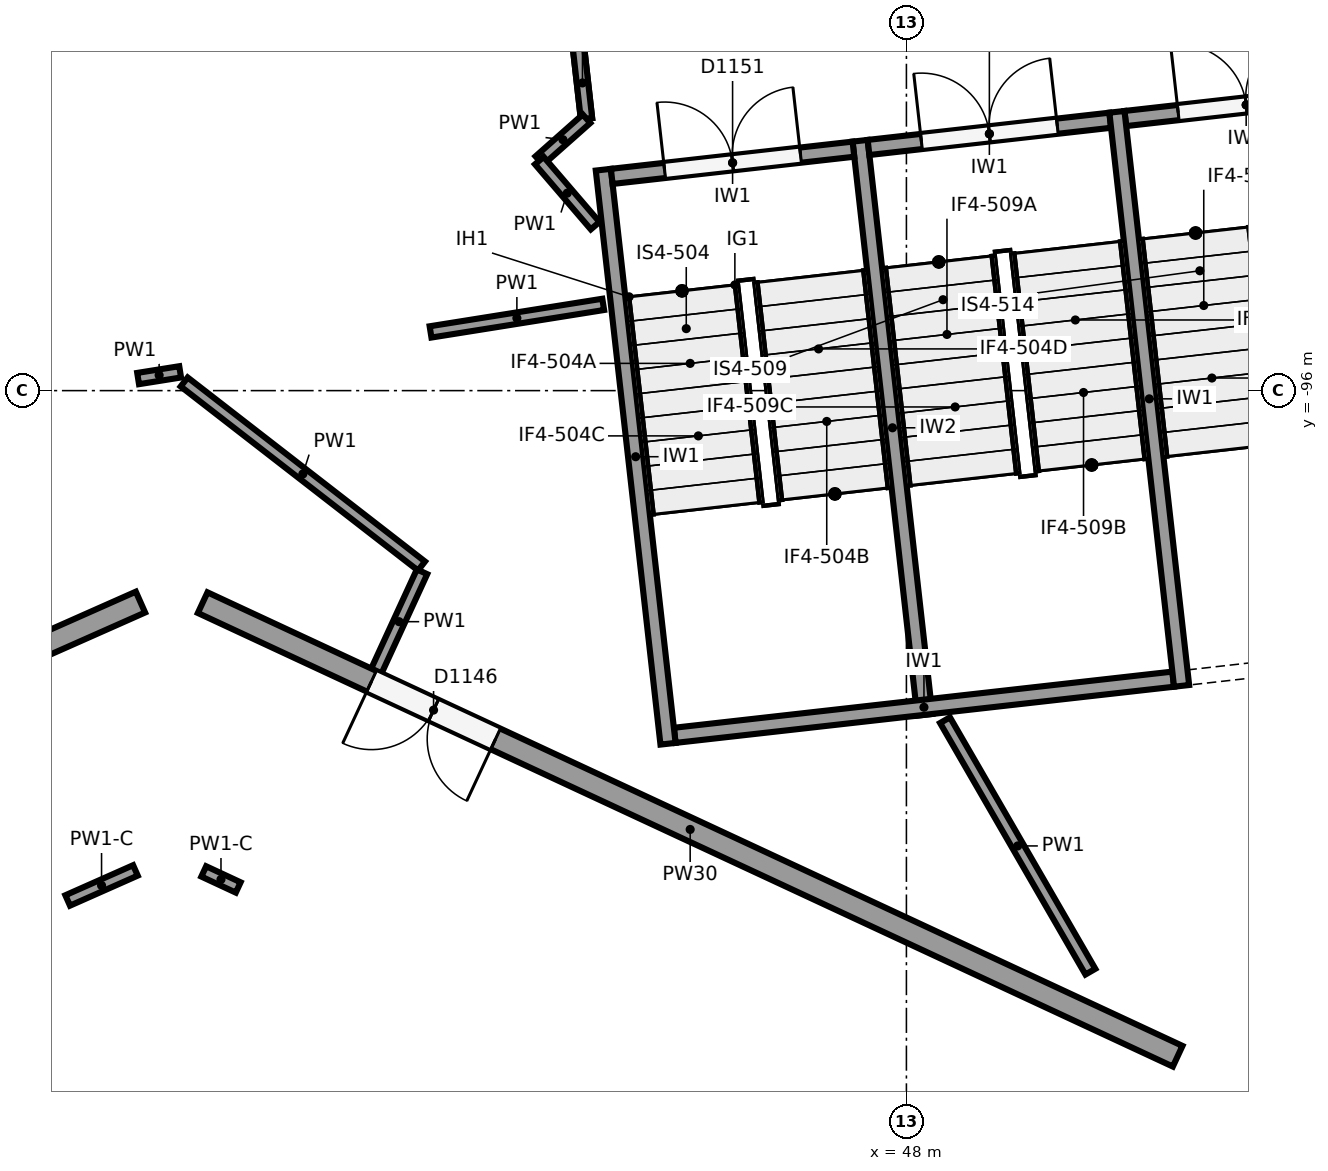
"""IFC4 building model, lengths in metres.
Left out: names, types, materials, properties, quantities, classifications, styles, units other than length and angle.
Written with IfcOpenShell. Run it as: python <this file> out.ifc"""

import sys

from ifc_helpers import new_model, si_unit, direction, frame, frame_2d, origin, origin_2d, place, context, subcontext, project, spatial, rectangle, circle, extrude, element, fill, save


model = new_model("IFC4")
c1 = context("Model", 3, precision=1e-05, world=origin(), true_north=direction((0.0, 1.0)))
c2 = subcontext(c1, "Body", "Model", "MODEL_VIEW")
j1 = project(units=[si_unit("LENGTHUNIT", "METRE"), si_unit("PLANEANGLEUNIT", "RADIAN")], contexts=[c1])
p1 = place(None, origin())
s1 = spatial("IfcSite", under=j1, at=p1, CompositionType="ELEMENT")
p2 = place(p1, origin())
s2 = spatial("IfcBuilding", under=s1, at=p2, CompositionType="ELEMENT")
p3 = place(p2, frame((0.0, 0.0, 12.0)))
s3 = spatial("IfcBuildingStorey", under=s2, at=p3, CompositionType="ELEMENT", Elevation=12.0)
p4 = place(p3, frame((38.333, -98.6, 0.0), z_axis=(0.0, 0.0, 1.0), x_axis=(1.0, 0.0, 0.0)))
e1 = element("IfcColumn", 1, at=p4, inside=s3, PredefinedType="COLUMN", context=c2, shape_type="SweptSolid", body=[
    extrude(circle(Radius=0.45, at=origin_2d()), origin(), (0.0, 0.0, 1.0), 6.0),
])
p5 = place(p3, frame((44.683, -91.091, 0.0), z_axis=(0.0, 0.0, 1.0), x_axis=(1.0, 0.0, 0.0)))
e2 = element("IfcColumn", 2, at=p5, inside=s3, PredefinedType="COLUMN", context=c2, shape_type="SweptSolid", body=[
    extrude(circle(Radius=0.55, at=origin_2d()), origin(), (0.0, 0.0, 1.0), 6.0),
])
p6 = place(p3, frame((52.203, -105.052, 0.0), z_axis=(0.0, 0.0, 1.0), x_axis=(1.0, 0.0, 0.0)))
e3 = element("IfcColumn", 3, at=p6, inside=s3, PredefinedType="COLUMN", context=c2, shape_type="SweptSolid", body=[
    extrude(circle(Radius=0.7, at=origin_2d()), origin(), (0.0, 0.0, 1.0), 6.0),
])
p7 = place(p3, frame((38.333, -102.6, 0.0), z_axis=(0.0, 0.0, 1.0), x_axis=(1.0, 0.0, 0.0)))
e4 = element("IfcColumn", 4, at=p7, inside=s3, PredefinedType="COLUMN", context=c2, shape_type="SweptSolid", body=[
    extrude(circle(Radius=0.4, at=origin_2d()), origin(), (0.0, 0.0, 1.0), 6.0),
])
p8 = place(p3, frame((37.922, -98.782, 0.0), z_axis=(0.0, 0.0, 1.0), x_axis=(-0.914138897099, -0.405401130748, 0.0)))
e5 = element("IfcWall", 5, at=p8, inside=s3, PredefinedType="SOLIDWALL", context=c2, shape_type="SweptSolid", body=[
    extrude(rectangle(XDim=15.824, YDim=0.3, at=frame_2d((7.912, 0.0))), origin(), (0.0, 0.0, 1.0), 4.35),
])
p9 = place(p3, frame((51.569, -104.757, 0.0), z_axis=(0.0, 0.0, 1.0), x_axis=(-0.906698705786, 0.421778919491, 0.0)))
e6 = element("IfcWall", 6, at=p9, inside=s3, PredefinedType="SOLIDWALL", context=c2, shape_type="SweptSolid", body=[
    extrude(rectangle(XDim=14.148, YDim=0.3, at=frame_2d((7.074, 0.0))), origin(), (0.0, 0.0, 1.0), 4.35),
])
p10 = place(p9, frame((9.897, 0.0, 0.0)))
e7 = element("IfcOpeningElement", 7, at=p10, cuts=e6, PredefinedType="OPENING", context=c2, shape_type="SweptSolid", body=[
    extrude(rectangle(XDim=1.8, YDim=2.4, at=frame_2d((0.9, 1.2))), frame((0.0, 0.16, 0.0), z_axis=(0.0, -1.0, 0.0), x_axis=(1.0, 0.0, 0.0)), (0.0, 0.0, 1.0), 0.32),
])
p11 = place(p3, frame((44.863, -100.646, 0.0), z_axis=(0.0, 0.0, 1.0), x_axis=(-0.111951003472, 0.993713727802, 0.0)))
e8 = element("IfcWall", 8, at=p11, inside=s3, PredefinedType="SHEAR", context=c2, shape_type="SweptSolid", body=[
    extrude(rectangle(XDim=7.6, YDim=0.2, at=frame_2d((3.8, 0.0))), origin(), (0.0, 0.0, 1.0), 5.65),
])
p12 = place(p3, frame((51.621, -99.885, 0.0), z_axis=(0.0, 0.0, 1.0), x_axis=(-0.111947429915, 0.993714130389, 0.0)))
e9 = element("IfcWall", 9, at=p12, inside=s3, PredefinedType="SHEAR", context=c2, shape_type="SweptSolid", body=[
    extrude(rectangle(XDim=7.6, YDim=0.2, at=frame_2d((3.8, 0.0))), origin(), (0.0, 0.0, 1.0), 5.65),
])
for number, where, z_axis, x_axis in (
    (10, (44.951, -100.535, 0.0), (0.0, 0.0, 1.0), (0.994, 0.112, 0.0)),
    (11, (51.709, -99.774, 0.0), (0.0, 0.0, 1.0), (0.994, 0.112, 0.0)),
):
    element("IfcWall", number, at=place(p3, frame(where, z_axis=z_axis, x_axis=x_axis)), inside=s3, PredefinedType="SHEAR", context=c2, shape_type="SweptSolid", body=[
        extrude(rectangle(XDim=6.6, YDim=0.2, at=frame_2d((3.3, 0.0))), origin(), (0.0, 0.0, 1.0), 5.65),
    ])
p13 = place(p3, frame((48.242, -100.265, 0.0), z_axis=(0.0, 0.0, 1.0), x_axis=(-0.111954577255, 0.993713325176, 0.0)))
e12 = element("IfcWall", 12, at=p13, inside=s3, PredefinedType="SHEAR", context=c2, shape_type="SweptSolid", body=[
    extrude(rectangle(XDim=7.6, YDim=0.2, at=frame_2d((3.8, 0.0))), origin(), (0.0, 0.0, 1.0), 5.65),
])
p14 = place(p3, frame((44.123, -93.182, 0.0), z_axis=(0.0, 0.0, 1.0), x_axis=(0.993717005286, 0.11192190762, 0.0)))
e13 = element("IfcWall", 13, at=p14, inside=s3, PredefinedType="SHEAR", context=c2, shape_type="SweptSolid", body=[
    extrude(rectangle(XDim=3.2, YDim=0.2, at=frame_2d((1.6, 0.0))), origin(), (0.0, 0.0, 1.0), 5.65),
])
p15 = place(p14, frame((0.7, 0.0, 0.0)))
e14 = element("IfcOpeningElement", 14, at=p15, cuts=e13, PredefinedType="OPENING", context=c2, shape_type="SweptSolid", body=[
    extrude(rectangle(XDim=1.8, YDim=2.1, at=frame_2d((0.9, 1.05))), frame((0.0, 0.11, 0.0), z_axis=(0.0, -1.0, 0.0), x_axis=(1.0, 0.0, 0.0)), (0.0, 0.0, 1.0), 0.22),
])
p16 = place(p3, frame((47.502, -92.801, 0.0), z_axis=(0.0, 0.0, 1.0), x_axis=(0.993707560215, 0.112005735442, 0.0)))
e15 = element("IfcWall", 15, at=p16, inside=s3, PredefinedType="SHEAR", context=c2, shape_type="SweptSolid", body=[
    extrude(rectangle(XDim=3.2, YDim=0.2, at=frame_2d((1.6, 0.0))), origin(), (0.0, 0.0, 1.0), 5.65),
])
p17 = place(p16, frame((0.7, 0.0, 0.0)))
e16 = element("IfcOpeningElement", 16, at=p17, cuts=e15, PredefinedType="OPENING", context=c2, shape_type="SweptSolid", body=[
    extrude(rectangle(XDim=1.8, YDim=2.1, at=frame_2d((0.9, 1.05))), frame((0.0, 0.11, 0.0), z_axis=(0.0, -1.0, 0.0), x_axis=(1.0, 0.0, 0.0)), (0.0, 0.0, 1.0), 0.22),
])
p18 = place(p3, frame((50.88, -92.42, 0.0), z_axis=(0.0, 0.0, 1.0), x_axis=(0.993707560215, 0.112005735442, 0.0)))
e17 = element("IfcWall", 17, at=p18, inside=s3, PredefinedType="SHEAR", context=c2, shape_type="SweptSolid", body=[
    extrude(rectangle(XDim=3.2, YDim=0.2, at=frame_2d((1.6, 0.0))), origin(), (0.0, 0.0, 1.0), 5.65),
])
p19 = place(p18, frame((0.7, 0.0, 0.0)))
e18 = element("IfcOpeningElement", 18, at=p19, cuts=e17, PredefinedType="OPENING", context=c2, shape_type="SweptSolid", body=[
    extrude(rectangle(XDim=1.8, YDim=2.1, at=frame_2d((0.9, 1.05))), frame((0.0, 0.11, 0.0), z_axis=(0.0, -1.0, 0.0), x_axis=(1.0, 0.0, 0.0)), (0.0, 0.0, 1.0), 0.22),
])
p20 = place(p3, frame((37.891, -95.841, 0.0), z_axis=(0.0, 0.0, 1.0), x_axis=(0.987546472481, 0.1573275713, 0.0)))
e19 = element("IfcWall", 19, at=p20, inside=s3, PredefinedType="PARTITIONING", context=c2, shape_type="SweptSolid", body=[
    extrude(rectangle(XDim=0.56, YDim=0.15, at=frame_2d((0.28, 0.0))), origin(), (0.0, 0.0, 1.0), 5.65),
])
p21 = place(p3, frame((48.508, -100.336, 0.0), z_axis=(0.0, 0.0, 1.0), x_axis=(0.500439359674, -0.865771590715, 0.0)))
e20 = element("IfcWall", 20, at=p21, inside=s3, PredefinedType="PARTITIONING", context=c2, shape_type="SweptSolid", body=[
    extrude(rectangle(XDim=3.822, YDim=0.15, at=frame_2d((1.911, 0.0))), origin(), (0.0, 0.0, 1.0), 5.65),
])
p22 = place(p3, frame((36.965, -102.708, 0.0), z_axis=(0.0, 0.0, 1.0), x_axis=(0.914193086295, 0.4052789175, 0.0)))
e21 = element("IfcWall", 21, at=p22, inside=s3, PredefinedType="PARTITIONING", context=c2, shape_type="SweptSolid", body=[
    extrude(rectangle(XDim=0.975, YDim=0.15, at=frame_2d((0.488, 0.0))), origin(), (0.0, 0.0, 1.0), 5.55),
])
p23 = place(p3, frame((38.755, -102.325, 0.0), z_axis=(0.0, 0.0, 1.0), x_axis=(0.906755828453, -0.421656101067, 0.0)))
e22 = element("IfcWall", 22, at=p23, inside=s3, PredefinedType="PARTITIONING", context=c2, shape_type="SweptSolid", body=[
    extrude(rectangle(XDim=0.5, YDim=0.15, at=frame_2d((0.25, 0.0))), origin(), (0.0, 0.0, 1.0), 5.55),
])
p24 = place(p3, frame((38.498, -95.886, 0.0), z_axis=(0.0, 0.0, 1.0), x_axis=(0.790219801195, -0.612823519294, 0.0)))
e23 = element("IfcWall", 23, at=p24, inside=s3, PredefinedType="PARTITIONING", context=c2, shape_type="SweptSolid", body=[
    extrude(rectangle(XDim=3.951, YDim=0.15, at=frame_2d((1.976, 0.0))), origin(), (0.0, 0.0, 1.0), 5.65),
])
p25 = place(p3, frame((41.627, -98.383, 0.0), z_axis=(0.0, 0.0, 1.0), x_axis=(-0.418008717052, -0.908443015532, 0.0)))
e24 = element("IfcWall", 24, at=p25, inside=s3, PredefinedType="PARTITIONING", context=c2, shape_type="SweptSolid", body=[
    extrude(rectangle(XDim=1.446, YDim=0.15, at=frame_2d((0.723, 0.0))), origin(), (0.0, 0.0, 1.0), 5.65),
])
p26 = place(p3, frame((41.739, -95.228, 0.0), z_axis=(0.0, 0.0, 1.0), x_axis=(0.987519978733, 0.157493782745, 0.0)))
e25 = element("IfcWall", 25, at=p26, inside=s3, PredefinedType="PARTITIONING", context=c2, shape_type="SweptSolid", body=[
    extrude(rectangle(XDim=2.301, YDim=0.15, at=frame_2d((1.15, 0.0))), origin(), (0.0, 0.0, 1.0), 5.65),
])
p27 = place(p3, frame((43.154, -86.767, 0.0), z_axis=(0.0, 0.0, 1.0), x_axis=(0.111980060209, -0.993710453863, 0.0)))
e26 = element("IfcWall", 26, at=p27, inside=s3, PredefinedType="PARTITIONING", context=c2, shape_type="SweptSolid", body=[
    extrude(rectangle(XDim=5.693, YDim=0.15, at=frame_2d((2.846, 0.0))), origin(), (0.0, 0.0, 1.0), 4.55),
])
p28 = place(p27, frame((2.05, 0.0, 0.0)))
e27 = element("IfcOpeningElement", 27, at=p28, cuts=e26, PredefinedType="OPENING", context=c2, shape_type="SweptSolid", body=[
    extrude(rectangle(XDim=1.8, YDim=2.1, at=frame_2d((0.9, 1.05))), frame((0.0, 0.085, 0.0), z_axis=(0.0, -1.0, 0.0), x_axis=(1.0, 0.0, 0.0)), (0.0, 0.0, 1.0), 0.17),
])
p29 = place(p3, frame((43.685, -91.481, 4.55), z_axis=(0.0, 0.0, 1.0), x_axis=(0.11195679558, -0.99371307525, 0.0)))
e28 = element("IfcWall", 28, at=p29, inside=s3, PredefinedType="PARTITIONING", context=c2, shape_type="SweptSolid", body=[
    extrude(rectangle(XDim=0.948, YDim=0.15, at=frame_2d((0.474, 0.0))), origin(), (0.0, 0.0, 1.0), 1.1),
])
p30 = place(p3, frame((43.791, -92.423, 0.0), z_axis=(0.0, 0.0, 1.0), x_axis=(-0.748350259109, -0.66330376879, 0.0)))
e29 = element("IfcWall", 29, at=p30, inside=s3, PredefinedType="PARTITIONING", context=c2, shape_type="SweptSolid", body=[
    extrude(rectangle(XDim=0.83, YDim=0.15, at=frame_2d((0.415, 0.0))), origin(), (0.0, 0.0, 1.0), 5.65),
])
p31 = place(p3, frame((43.17, -92.974, 0.0), z_axis=(0.0, 0.0, 1.0), x_axis=(0.651040876816, -0.759042671208, 0.0)))
e30 = element("IfcWall", 30, at=p31, inside=s3, PredefinedType="PARTITIONING", context=c2, shape_type="SweptSolid", body=[
    extrude(rectangle(XDim=1.128, YDim=0.15, at=frame_2d((0.564, 0.0))), origin(), (0.0, 0.0, 1.0), 5.65),
])
p32 = place(p10, origin())
e31 = element("IfcDoor", 31, at=p32, inside=s3, OperationType="DOUBLE_DOOR_SINGLE_SWING", PredefinedType="DOOR", context=c2, shape_type="SweptSolid", body=[
    extrude(rectangle(XDim=1.8, YDim=2.4, at=frame_2d((0.9, 1.2))), frame((0.0, 0.025, 0.0), z_axis=(0.0, -1.0, 0.0), x_axis=(1.0, 0.0, 0.0)), (0.0, 0.0, 1.0), 0.05),
])
fill(e7, e31)
p33 = place(p15, origin())
e32 = element("IfcDoor", 32, at=p33, inside=s3, OperationType="DOUBLE_DOOR_SINGLE_SWING", PredefinedType="DOOR", context=c2, shape_type="SweptSolid", body=[
    extrude(rectangle(XDim=1.8, YDim=2.1, at=frame_2d((0.9, 1.05))), frame((0.0, 0.025, 0.0), z_axis=(0.0, -1.0, 0.0), x_axis=(1.0, 0.0, 0.0)), (0.0, 0.0, 1.0), 0.05),
])
fill(e14, e32)
p34 = place(p17, origin())
e33 = element("IfcDoor", 33, at=p34, inside=s3, OperationType="DOUBLE_DOOR_SINGLE_SWING", PredefinedType="DOOR", context=c2, shape_type="SweptSolid", body=[
    extrude(rectangle(XDim=1.8, YDim=2.1, at=frame_2d((0.9, 1.05))), frame((0.0, 0.025, 0.0), z_axis=(0.0, -1.0, 0.0), x_axis=(1.0, 0.0, 0.0)), (0.0, 0.0, 1.0), 0.05),
])
fill(e16, e33)
p35 = place(p19, origin())
e34 = element("IfcDoor", 34, at=p35, inside=s3, OperationType="DOUBLE_DOOR_SINGLE_SWING", PredefinedType="DOOR", context=c2, shape_type="SweptSolid", body=[
    extrude(rectangle(XDim=1.8, YDim=2.1, at=frame_2d((0.9, 1.05))), frame((0.0, 0.025, 0.0), z_axis=(0.0, -1.0, 0.0), x_axis=(1.0, 0.0, 0.0)), (0.0, 0.0, 1.0), 0.05),
])
fill(e18, e34)
save(model, sys.argv[1])
